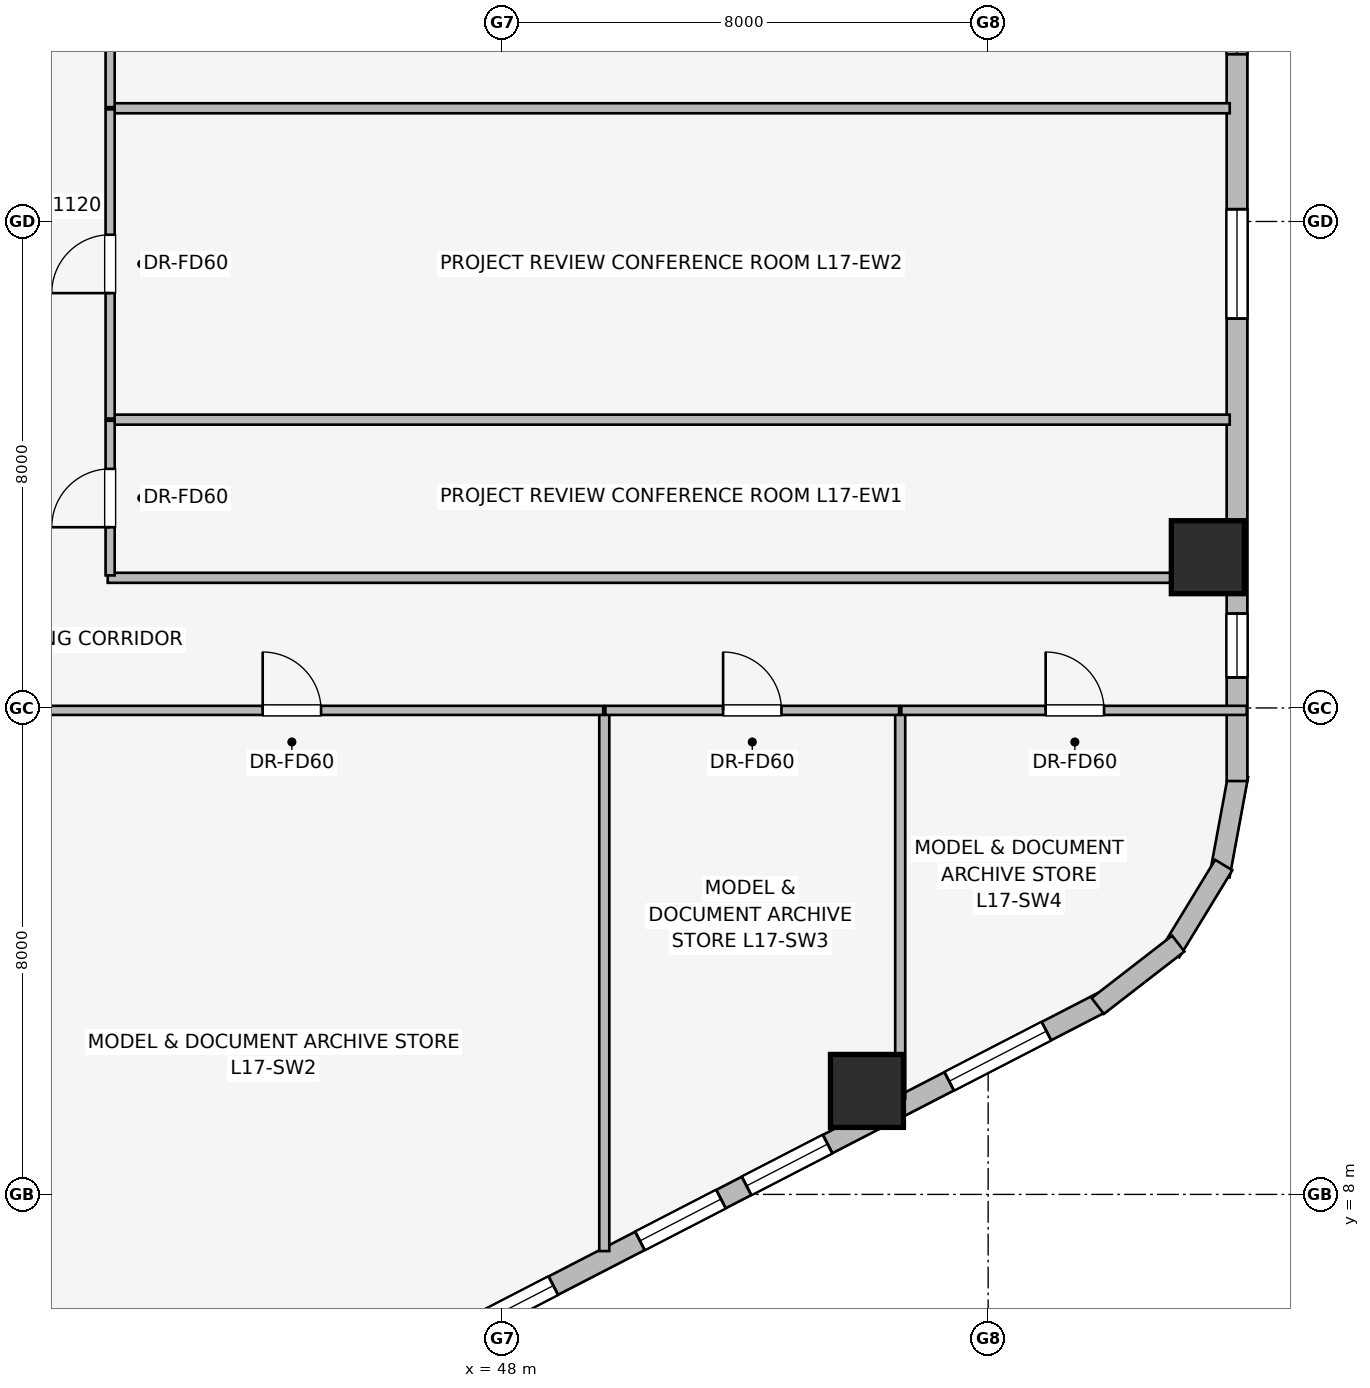
"""IFC4 building model, lengths in metres.
Left out: names, types, materials, properties, quantities, classifications, styles, units other than length and angle.
Written with IfcOpenShell. Run it as: python <this file> out.ifc"""

import sys

from ifc_helpers import new_model, si_unit, direction, frame, frame_2d, origin, origin_2d, place, context, subcontext, project, spatial, rectangle, extrude, element, fill, save


model = new_model("IFC4")
c1 = context("Model", 3, precision=1e-05, world=origin(), true_north=direction((0.0, 1.0)))
c2 = subcontext(c1, "Body", "Model", "MODEL_VIEW")
j1 = project(units=[si_unit("LENGTHUNIT", "METRE"), si_unit("PLANEANGLEUNIT", "RADIAN")], contexts=[c1])
p1 = place(None, origin())
s1 = spatial("IfcSite", under=j1, at=p1, CompositionType="ELEMENT")
p2 = place(p1, origin())
s2 = spatial("IfcBuilding", under=s1, at=p2, CompositionType="ELEMENT")
p3 = place(p2, frame((0.0, 0.0, 67.15)))
s3 = spatial("IfcBuildingStorey", under=s2, at=p3, CompositionType="ELEMENT", Elevation=67.15)
for number, where, z_axis, x_axis in (
    (1, (54.007, 9.702, 0.0), (0.0, 0.0, 1.0), (1.0, 0.0, 0.0)),
    (2, (59.613, 18.479, 0.0), (0.0, 0.0, 1.0), (1.0, 0.0, 0.0)),
):
    element("IfcColumn", number, at=place(p3, frame(where, z_axis=z_axis, x_axis=x_axis)), inside=s3, PredefinedType="COLUMN", context=c2, shape_type="SweptSolid", body=[
        extrude(rectangle(XDim=1.2, YDim=1.2, at=origin_2d()), origin(), (0.0, 0.0, 1.0), 3.65),
    ])
p4 = place(p3, frame((57.876, 11.159, 0.0), z_axis=(0.0, 0.0, 1.0), x_axis=(-0.888634413993, -0.458616264721, 0.0)))
e3 = element("IfcWall", 3, at=p4, inside=s3, PredefinedType="STANDARD", context=c2, shape_type="SweptSolid", body=[
    extrude(rectangle(XDim=20.531, YDim=0.34, at=frame_2d((10.266, 0.0))), origin(), (0.0, 0.0, 1.0), 2.684),
])
p5 = place(p4, frame((1.032, 0.0, 0.75)))
e4 = element("IfcOpeningElement", 4, at=p5, cuts=e3, PredefinedType="OPENING", context=c2, shape_type="SweptSolid", body=[
    extrude(rectangle(XDim=1.8, YDim=1.5, at=frame_2d((0.9, 0.75))), frame((0.0, 0.18, 0.0), z_axis=(0.0, -1.0, 0.0), x_axis=(1.0, 0.0, 0.0)), (0.0, 0.0, 1.0), 0.36),
])
p6 = place(p4, frame((5.082, 0.0, 0.75)))
e5 = element("IfcOpeningElement", 5, at=p6, cuts=e3, PredefinedType="OPENING", context=c2, shape_type="SweptSolid", body=[
    extrude(rectangle(XDim=1.5, YDim=1.5, at=frame_2d((0.75, 0.75))), frame((0.0, 0.18, 0.0), z_axis=(0.0, -1.0, 0.0), x_axis=(1.0, 0.0, 0.0)), (0.0, 0.0, 1.0), 0.36),
])
p7 = place(p4, frame((7.055, 0.0, 0.75)))
e6 = element("IfcOpeningElement", 6, at=p7, cuts=e3, PredefinedType="OPENING", context=c2, shape_type="SweptSolid", body=[
    extrude(rectangle(XDim=1.5, YDim=1.5, at=frame_2d((0.75, 0.75))), frame((0.0, 0.18, 0.0), z_axis=(0.0, -1.0, 0.0), x_axis=(1.0, 0.0, 0.0)), (0.0, 0.0, 1.0), 0.36),
])
p8 = place(p4, frame((10.158, 0.0, 0.75)))
e7 = element("IfcOpeningElement", 7, at=p8, cuts=e3, PredefinedType="OPENING", context=c2, shape_type="SweptSolid", body=[
    extrude(rectangle(XDim=1.8, YDim=1.5, at=frame_2d((0.9, 0.75))), frame((0.0, 0.18, 0.0), z_axis=(0.0, -1.0, 0.0), x_axis=(1.0, 0.0, 0.0)), (0.0, 0.0, 1.0), 0.36),
])
p9 = place(p4, frame((13.243, 0.0, 0.75)))
e8 = element("IfcOpeningElement", 8, at=p9, cuts=e3, PredefinedType="OPENING", context=c2, shape_type="SweptSolid", body=[
    extrude(rectangle(XDim=1.8, YDim=1.5, at=frame_2d((0.9, 0.75))), frame((0.0, 0.18, 0.0), z_axis=(0.0, -1.0, 0.0), x_axis=(1.0, 0.0, 0.0)), (0.0, 0.0, 1.0), 0.36),
])
p10 = place(p4, frame((17.823, 0.0, 0.75)))
e9 = element("IfcOpeningElement", 9, at=p10, cuts=e3, PredefinedType="OPENING", context=c2, shape_type="SweptSolid", body=[
    extrude(rectangle(XDim=1.5, YDim=1.5, at=frame_2d((0.75, 0.75))), frame((0.0, 0.18, 0.0), z_axis=(0.0, -1.0, 0.0), x_axis=(1.0, 0.0, 0.0)), (0.0, 0.0, 1.0), 0.36),
])
p11 = place(p3, frame((60.113, 14.892, 0.0), z_axis=(0.0, 0.0, 1.0), x_axis=(-0.181714143354, -0.983351397063, 0.0)))
e10 = element("IfcWall", 10, at=p11, inside=s3, PredefinedType="STANDARD", context=c2, shape_type="SweptSolid", body=[
    extrude(rectangle(XDim=1.678, YDim=0.33, at=frame_2d((0.839, 0.0))), origin(), (0.0, 0.0, 1.0), 3.39),
])
p12 = place(p3, frame((59.875, 13.417, 0.0), z_axis=(0.0, 0.0, 1.0), x_axis=(-0.520584129191, -0.853810379671, 0.0)))
e11 = element("IfcWall", 11, at=p12, inside=s3, PredefinedType="STANDARD", context=c2, shape_type="SweptSolid", body=[
    extrude(rectangle(XDim=1.677, YDim=0.33, at=frame_2d((0.838, 0.0))), origin(), (0.0, 0.0, 1.0), 3.39),
])
p13 = place(p3, frame((59.127, 12.125, 0.0), z_axis=(0.0, 0.0, 1.0), x_axis=(-0.790691856293, -0.61221433207, 0.0)))
e12 = element("IfcWall", 12, at=p13, inside=s3, PredefinedType="STANDARD", context=c2, shape_type="SweptSolid", body=[
    extrude(rectangle(XDim=1.676, YDim=0.33, at=frame_2d((0.838, 0.0))), origin(), (0.0, 0.0, 1.0), 3.39),
])
p14 = place(p3, frame((60.093, 33.202, 0.0), z_axis=(0.0, 0.0, 1.0), x_axis=(0.0, -1.0, 0.0)))
e13 = element("IfcWall", 13, at=p14, inside=s3, PredefinedType="STANDARD", context=c2, shape_type="SweptSolid", body=[
    extrude(rectangle(XDim=18.404, YDim=0.34, at=frame_2d((9.202, 0.0))), origin(), (0.0, 0.0, 1.0), 2.684),
])
p15 = place(p14, frame((1.744, 0.0, 0.75)))
e14 = element("IfcOpeningElement", 14, at=p15, cuts=e13, PredefinedType="OPENING", context=c2, shape_type="SweptSolid", body=[
    extrude(rectangle(XDim=1.05, YDim=1.4, at=frame_2d((0.525, 0.7))), frame((0.0, 0.18, 0.0), z_axis=(0.0, -1.0, 0.0), x_axis=(1.0, 0.0, 0.0)), (0.0, 0.0, 1.0), 0.36),
])
p16 = place(p14, frame((4.949, 0.0, 0.75)))
e15 = element("IfcOpeningElement", 15, at=p16, cuts=e13, PredefinedType="OPENING", context=c2, shape_type="SweptSolid", body=[
    extrude(rectangle(XDim=1.5, YDim=1.5, at=frame_2d((0.75, 0.75))), frame((0.0, 0.18, 0.0), z_axis=(0.0, -1.0, 0.0), x_axis=(1.0, 0.0, 0.0)), (0.0, 0.0, 1.0), 0.36),
])
p17 = place(p14, frame((9.0, 0.0, 0.75)))
e16 = element("IfcOpeningElement", 16, at=p17, cuts=e13, PredefinedType="OPENING", context=c2, shape_type="SweptSolid", body=[
    extrude(rectangle(XDim=1.8, YDim=1.5, at=frame_2d((0.9, 0.75))), frame((0.0, 0.18, 0.0), z_axis=(0.0, -1.0, 0.0), x_axis=(1.0, 0.0, 0.0)), (0.0, 0.0, 1.0), 0.36),
])
p18 = place(p14, frame((15.65, 0.0, 0.75)))
e17 = element("IfcOpeningElement", 17, at=p18, cuts=e13, PredefinedType="OPENING", context=c2, shape_type="SweptSolid", body=[
    extrude(rectangle(XDim=1.05, YDim=1.4, at=frame_2d((0.525, 0.7))), frame((0.0, 0.18, 0.0), z_axis=(0.0, -1.0, 0.0), x_axis=(1.0, 0.0, 0.0)), (0.0, 0.0, 1.0), 0.36),
])
p19 = place(p3, frame((41.52, 18.14, 0.0), z_axis=(0.0, 0.0, 1.0), x_axis=(1.0, 0.0, 0.0)))
e18 = element("IfcWall", 18, at=p19, inside=s3, PredefinedType="PARTITIONING", context=c2, shape_type="SweptSolid", body=[
    extrude(rectangle(XDim=18.453, YDim=0.165, at=frame_2d((9.227, 0.0))), origin(), (0.0, 0.0, 1.0), 3.39),
])
p20 = place(p3, frame((41.59, 20.741, 0.0), z_axis=(0.0, 0.0, 1.0), x_axis=(1.0, 0.0, 0.0)))
e19 = element("IfcWall", 19, at=p20, inside=s3, PredefinedType="PARTITIONING", context=c2, shape_type="SweptSolid", body=[
    extrude(rectangle(XDim=18.383, YDim=0.165, at=frame_2d((9.191, 0.0))), origin(), (0.0, 0.0, 1.0), 2.694),
])
p21 = place(p3, frame((41.59, 25.862, 0.0), z_axis=(0.0, 0.0, 1.0), x_axis=(1.0, 0.0, 0.0)))
e20 = element("IfcWall", 20, at=p21, inside=s3, PredefinedType="PARTITIONING", context=c2, shape_type="SweptSolid", body=[
    extrude(rectangle(XDim=18.383, YDim=0.165, at=frame_2d((9.191, 0.0))), origin(), (0.0, 0.0, 1.0), 3.39),
])
p22 = place(p3, frame((41.56, 18.18, 0.0), z_axis=(0.0, 0.0, 1.0), x_axis=(0.0, 1.0, 0.0)))
e21 = element("IfcWall", 21, at=p22, inside=s3, PredefinedType="PARTITIONING", context=c2, shape_type="SweptSolid", body=[
    extrude(rectangle(XDim=2.543, YDim=0.15, at=frame_2d((1.271, 0.0))), origin(), (0.0, 0.0, 1.0), 3.39),
])
p23 = place(p22, frame((0.792, 0.0, 0.0)))
e22 = element("IfcOpeningElement", 22, at=p23, cuts=e21, PredefinedType="OPENING", context=c2, shape_type="SweptSolid", body=[
    extrude(rectangle(XDim=0.96, YDim=2.0, at=frame_2d((0.48, 1.0))), frame((0.0, 0.085, 0.0), z_axis=(0.0, -1.0, 0.0), x_axis=(1.0, 0.0, 0.0)), (0.0, 0.0, 1.0), 0.17),
])
p24 = place(p3, frame((41.56, 20.759, 0.0), z_axis=(0.0, 0.0, 1.0), x_axis=(0.0, 1.0, 0.0)))
e23 = element("IfcWall", 23, at=p24, inside=s3, PredefinedType="PARTITIONING", context=c2, shape_type="SweptSolid", body=[
    extrude(rectangle(XDim=5.085, YDim=0.15, at=frame_2d((2.542, 0.0))), origin(), (0.0, 0.0, 1.0), 3.39),
])
p25 = place(p24, frame((2.063, 0.0, 0.0)))
e24 = element("IfcOpeningElement", 24, at=p25, cuts=e23, PredefinedType="OPENING", context=c2, shape_type="SweptSolid", body=[
    extrude(rectangle(XDim=0.96, YDim=2.0, at=frame_2d((0.48, 1.0))), frame((0.0, 0.085, 0.0), z_axis=(0.0, -1.0, 0.0), x_axis=(1.0, 0.0, 0.0)), (0.0, 0.0, 1.0), 0.17),
])
p26 = place(p3, frame((41.56, 25.88, 0.0), z_axis=(0.0, 0.0, 1.0), x_axis=(0.0, 1.0, 0.0)))
e25 = element("IfcWall", 25, at=p26, inside=s3, PredefinedType="PARTITIONING", context=c2, shape_type="SweptSolid", body=[
    extrude(rectangle(XDim=3.94, YDim=0.15, at=frame_2d((1.97, 0.0))), origin(), (0.0, 0.0, 1.0), 3.39),
])
p27 = place(p26, frame((1.49, 0.0, 0.0)))
e26 = element("IfcOpeningElement", 26, at=p27, cuts=e25, PredefinedType="OPENING", context=c2, shape_type="SweptSolid", body=[
    extrude(rectangle(XDim=0.96, YDim=2.0, at=frame_2d((0.48, 1.0))), frame((0.0, 0.085, 0.0), z_axis=(0.0, -1.0, 0.0), x_axis=(1.0, 0.0, 0.0)), (0.0, 0.0, 1.0), 0.17),
])
p28 = place(p3, frame((49.687, 7.068, 0.0), z_axis=(0.0, 0.0, 1.0), x_axis=(0.0, 1.0, 0.0)))
e27 = element("IfcWall", 27, at=p28, inside=s3, PredefinedType="PARTITIONING", context=c2, shape_type="SweptSolid", body=[
    extrude(rectangle(XDim=8.862, YDim=0.165, at=frame_2d((4.431, 0.0))), origin(), (0.0, 0.0, 1.0), 3.39),
])
p29 = place(p3, frame((54.554, 9.58, 0.0), z_axis=(0.0, 0.0, 1.0), x_axis=(0.0, 1.0, 0.0)))
e28 = element("IfcWall", 28, at=p29, inside=s3, PredefinedType="PARTITIONING", context=c2, shape_type="SweptSolid", body=[
    extrude(rectangle(XDim=6.35, YDim=0.165, at=frame_2d((3.175, 0.0))), origin(), (0.0, 0.0, 1.0), 3.39),
])
p30 = place(p3, frame((39.428, 15.96, 0.0), z_axis=(0.0, 0.0, 1.0), x_axis=(1.0, 0.0, 0.0)))
e29 = element("IfcWall", 29, at=p30, inside=s3, PredefinedType="PARTITIONING", context=c2, shape_type="SweptSolid", body=[
    extrude(rectangle(XDim=10.241, YDim=0.15, at=frame_2d((5.121, 0.0))), origin(), (0.0, 0.0, 1.0), 3.39),
])
p31 = place(p30, frame((4.641, 0.0, 0.0)))
e30 = element("IfcOpeningElement", 30, at=p31, cuts=e29, PredefinedType="OPENING", context=c2, shape_type="SweptSolid", body=[
    extrude(rectangle(XDim=0.96, YDim=2.0, at=frame_2d((0.48, 1.0))), frame((0.0, 0.085, 0.0), z_axis=(0.0, -1.0, 0.0), x_axis=(1.0, 0.0, 0.0)), (0.0, 0.0, 1.0), 0.17),
])
p32 = place(p3, frame((49.705, 15.96, 0.0), z_axis=(0.0, 0.0, 1.0), x_axis=(1.0, 0.0, 0.0)))
e31 = element("IfcWall", 31, at=p32, inside=s3, PredefinedType="PARTITIONING", context=c2, shape_type="SweptSolid", body=[
    extrude(rectangle(XDim=4.831, YDim=0.15, at=frame_2d((2.416, 0.0))), origin(), (0.0, 0.0, 1.0), 3.39),
])
p33 = place(p32, frame((1.936, 0.0, 0.0)))
e32 = element("IfcOpeningElement", 32, at=p33, cuts=e31, PredefinedType="OPENING", context=c2, shape_type="SweptSolid", body=[
    extrude(rectangle(XDim=0.96, YDim=2.0, at=frame_2d((0.48, 1.0))), frame((0.0, 0.085, 0.0), z_axis=(0.0, -1.0, 0.0), x_axis=(1.0, 0.0, 0.0)), (0.0, 0.0, 1.0), 0.17),
])
p34 = place(p3, frame((54.572, 15.96, 0.0), z_axis=(0.0, 0.0, 1.0), x_axis=(1.0, 0.0, 0.0)))
e33 = element("IfcWall", 33, at=p34, inside=s3, PredefinedType="PARTITIONING", context=c2, shape_type="SweptSolid", body=[
    extrude(rectangle(XDim=5.681, YDim=0.15, at=frame_2d((2.84, 0.0))), origin(), (0.0, 0.0, 1.0), 3.39),
])
p35 = place(p34, frame((2.374, 0.0, 0.0)))
e34 = element("IfcOpeningElement", 34, at=p35, cuts=e33, PredefinedType="OPENING", context=c2, shape_type="SweptSolid", body=[
    extrude(rectangle(XDim=0.96, YDim=2.0, at=frame_2d((0.48, 1.0))), frame((0.0, 0.085, 0.0), z_axis=(0.0, -1.0, 0.0), x_axis=(1.0, 0.0, 0.0)), (0.0, 0.0, 1.0), 0.17),
])
p36 = place(p5, origin())
e35 = element("IfcWindow", 35, at=p36, inside=s3, PartitioningType="SINGLE_PANEL", PredefinedType="WINDOW", context=c2, shape_type="SweptSolid", body=[
    extrude(rectangle(XDim=1.8, YDim=1.5, at=frame_2d((0.9, 0.75))), frame((0.0, 0.03, 0.0), z_axis=(0.0, -1.0, 0.0), x_axis=(1.0, 0.0, 0.0)), (0.0, 0.0, 1.0), 0.06),
])
fill(e4, e35)
p37 = place(p6, origin())
e36 = element("IfcWindow", 36, at=p37, inside=s3, PartitioningType="SINGLE_PANEL", PredefinedType="WINDOW", context=c2, shape_type="SweptSolid", body=[
    extrude(rectangle(XDim=1.5, YDim=1.5, at=frame_2d((0.75, 0.75))), frame((0.0, 0.03, 0.0), z_axis=(0.0, -1.0, 0.0), x_axis=(1.0, 0.0, 0.0)), (0.0, 0.0, 1.0), 0.06),
])
fill(e5, e36)
p38 = place(p7, origin())
e37 = element("IfcWindow", 37, at=p38, inside=s3, PartitioningType="SINGLE_PANEL", PredefinedType="WINDOW", context=c2, shape_type="SweptSolid", body=[
    extrude(rectangle(XDim=1.5, YDim=1.5, at=frame_2d((0.75, 0.75))), frame((0.0, 0.03, 0.0), z_axis=(0.0, -1.0, 0.0), x_axis=(1.0, 0.0, 0.0)), (0.0, 0.0, 1.0), 0.06),
])
fill(e6, e37)
p39 = place(p8, origin())
e38 = element("IfcWindow", 38, at=p39, inside=s3, PartitioningType="SINGLE_PANEL", PredefinedType="WINDOW", context=c2, shape_type="SweptSolid", body=[
    extrude(rectangle(XDim=1.8, YDim=1.5, at=frame_2d((0.9, 0.75))), frame((0.0, 0.03, 0.0), z_axis=(0.0, -1.0, 0.0), x_axis=(1.0, 0.0, 0.0)), (0.0, 0.0, 1.0), 0.06),
])
fill(e7, e38)
p40 = place(p16, origin())
e39 = element("IfcWindow", 39, at=p40, inside=s3, PartitioningType="SINGLE_PANEL", PredefinedType="WINDOW", context=c2, shape_type="SweptSolid", body=[
    extrude(rectangle(XDim=1.5, YDim=1.5, at=frame_2d((0.75, 0.75))), frame((0.0, 0.03, 0.0), z_axis=(0.0, -1.0, 0.0), x_axis=(1.0, 0.0, 0.0)), (0.0, 0.0, 1.0), 0.06),
])
fill(e15, e39)
p41 = place(p17, origin())
e40 = element("IfcWindow", 40, at=p41, inside=s3, PartitioningType="SINGLE_PANEL", PredefinedType="WINDOW", context=c2, shape_type="SweptSolid", body=[
    extrude(rectangle(XDim=1.8, YDim=1.5, at=frame_2d((0.9, 0.75))), frame((0.0, 0.03, 0.0), z_axis=(0.0, -1.0, 0.0), x_axis=(1.0, 0.0, 0.0)), (0.0, 0.0, 1.0), 0.06),
])
fill(e16, e40)
p42 = place(p18, origin())
e41 = element("IfcWindow", 41, at=p42, inside=s3, PartitioningType="SINGLE_PANEL", PredefinedType="WINDOW", context=c2, shape_type="SweptSolid", body=[
    extrude(rectangle(XDim=1.05, YDim=1.4, at=frame_2d((0.525, 0.7))), frame((0.0, 0.03, 0.0), z_axis=(0.0, -1.0, 0.0), x_axis=(1.0, 0.0, 0.0)), (0.0, 0.0, 1.0), 0.06),
])
fill(e17, e41)
p43 = place(p23, origin())
e42 = element("IfcDoor", 42, at=p43, inside=s3, OperationType="SINGLE_SWING_LEFT", PredefinedType="DOOR", context=c2, shape_type="SweptSolid", body=[
    extrude(rectangle(XDim=0.96, YDim=2.0, at=frame_2d((0.48, 1.0))), frame((0.0, 0.025, 0.0), z_axis=(0.0, -1.0, 0.0), x_axis=(1.0, 0.0, 0.0)), (0.0, 0.0, 1.0), 0.05),
])
fill(e22, e42)
p44 = place(p25, origin())
e43 = element("IfcDoor", 43, at=p44, inside=s3, OperationType="SINGLE_SWING_LEFT", PredefinedType="DOOR", context=c2, shape_type="SweptSolid", body=[
    extrude(rectangle(XDim=0.96, YDim=2.0, at=frame_2d((0.48, 1.0))), frame((0.0, 0.025, 0.0), z_axis=(0.0, -1.0, 0.0), x_axis=(1.0, 0.0, 0.0)), (0.0, 0.0, 1.0), 0.05),
])
fill(e24, e43)
p45 = place(p31, origin())
e44 = element("IfcDoor", 44, at=p45, inside=s3, OperationType="SINGLE_SWING_LEFT", PredefinedType="DOOR", context=c2, shape_type="SweptSolid", body=[
    extrude(rectangle(XDim=0.96, YDim=2.0, at=frame_2d((0.48, 1.0))), frame((0.0, 0.025, 0.0), z_axis=(0.0, -1.0, 0.0), x_axis=(1.0, 0.0, 0.0)), (0.0, 0.0, 1.0), 0.05),
])
fill(e30, e44)
p46 = place(p33, origin())
e45 = element("IfcDoor", 45, at=p46, inside=s3, OperationType="SINGLE_SWING_LEFT", PredefinedType="DOOR", context=c2, shape_type="SweptSolid", body=[
    extrude(rectangle(XDim=0.96, YDim=2.0, at=frame_2d((0.48, 1.0))), frame((0.0, 0.025, 0.0), z_axis=(0.0, -1.0, 0.0), x_axis=(1.0, 0.0, 0.0)), (0.0, 0.0, 1.0), 0.05),
])
fill(e32, e45)
p47 = place(p35, origin())
e46 = element("IfcDoor", 46, at=p47, inside=s3, OperationType="SINGLE_SWING_LEFT", PredefinedType="DOOR", context=c2, shape_type="SweptSolid", body=[
    extrude(rectangle(XDim=0.96, YDim=2.0, at=frame_2d((0.48, 1.0))), frame((0.0, 0.025, 0.0), z_axis=(0.0, -1.0, 0.0), x_axis=(1.0, 0.0, 0.0)), (0.0, 0.0, 1.0), 0.05),
])
fill(e34, e46)
save(model, sys.argv[1])
